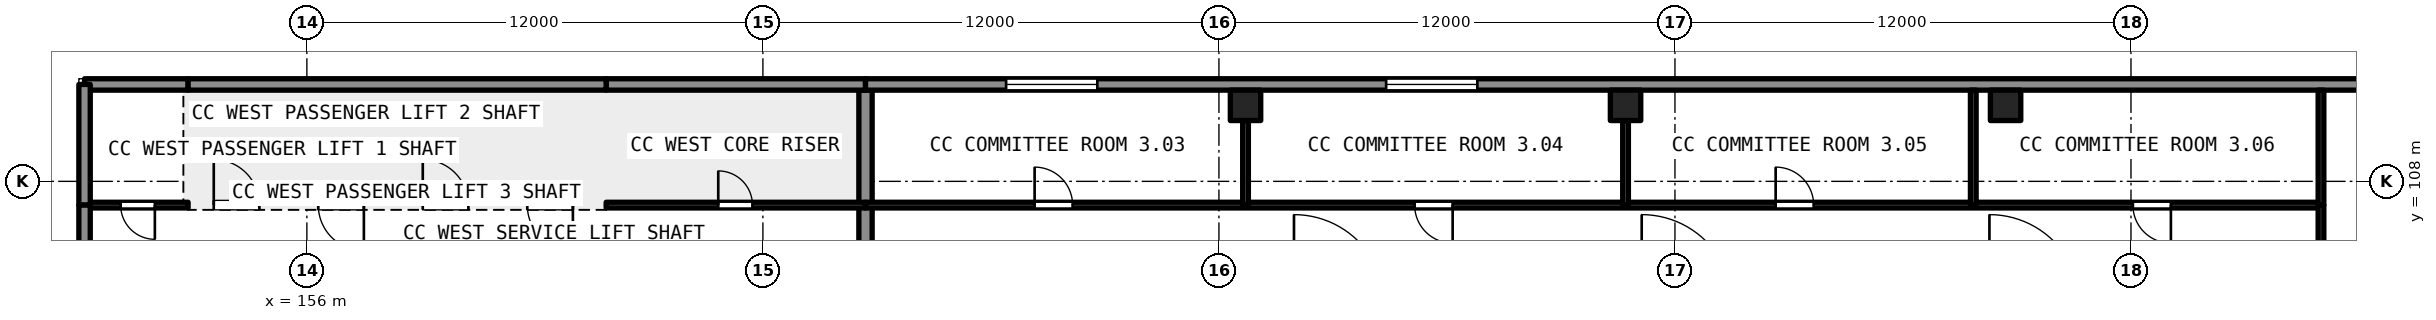
"""IFC4 building model, lengths in metres.
Left out: names, types, materials, properties, quantities, classifications, styles, units other than length and angle.
Written with IfcOpenShell. Run it as: python <this file> out.ifc"""

import sys

from ifc_helpers import new_model, si_unit, direction, frame, frame_2d, origin, origin_2d, place, context, subcontext, project, spatial, rectangle, extrude, element, fill, save


model = new_model("IFC4")
c1 = context("Model", 3, precision=1e-05, world=origin(), true_north=direction((0.0, 1.0)))
c2 = subcontext(c1, "Body", "Model", "MODEL_VIEW")
j1 = project(units=[si_unit("LENGTHUNIT", "METRE"), si_unit("PLANEANGLEUNIT", "RADIAN")], contexts=[c1])
p1 = place(None, origin())
s1 = spatial("IfcSite", under=j1, at=p1, CompositionType="ELEMENT")
p2 = place(p1, origin())
s2 = spatial("IfcBuilding", under=s1, at=p2, CompositionType="ELEMENT")
p3 = place(p2, frame((0.0, 0.0, 20.4)))
s3 = spatial("IfcBuildingStorey", under=s2, at=p3, CompositionType="ELEMENT", Elevation=20.4)
for number, where, z_axis, x_axis in (
    (1, (180.7, 110.0, 0.0), (0.0, 0.0, 1.0), (1.0, 0.0, 0.0)),
    (2, (190.7, 110.0, 0.0), (0.0, 0.0, 1.0), (1.0, 0.0, 0.0)),
    (3, (200.7, 110.0, 0.0), (0.0, 0.0, 1.0), (1.0, 0.0, 0.0)),
):
    element("IfcColumn", number, at=place(p3, frame(where, z_axis=z_axis, x_axis=x_axis)), inside=s3, PredefinedType="COLUMN", context=c2, shape_type="SweptSolid", body=[
        extrude(rectangle(XDim=0.8, YDim=0.8, at=origin_2d()), origin(), (0.0, 0.0, 1.0), 4.59),
    ])
p4 = place(p3, frame((170.7, 103.15, 0.0), z_axis=(0.0, 0.0, 1.0), x_axis=(0.0, 1.0, 0.0)))
e4 = element("IfcWall", 4, at=p4, inside=s3, PredefinedType="SHEAR", context=c2, shape_type="SweptSolid", body=[
    extrude(rectangle(XDim=7.25, YDim=0.35, at=frame_2d((3.625, 0.0))), origin(), (0.0, 0.0, 1.0), 4.59),
])
p5 = place(p4, frame((1.2, 0.0, 0.0)))
e5 = element("IfcOpeningElement", 5, at=p5, cuts=e4, PredefinedType="OPENING", context=c2, shape_type="SweptSolid", body=[
    extrude(rectangle(XDim=1.8, YDim=2.1, at=frame_2d((0.9, 1.05))), frame((0.0, 0.186, 0.0), z_axis=(0.0, -1.0, 0.0), x_axis=(1.0, 0.0, 0.0)), (0.0, 0.0, 1.0), 0.371),
])
p6 = place(p2, origin())
s4 = spatial("IfcBuildingStorey", under=s2, at=p6, CompositionType="ELEMENT", Elevation=0.0)
for number, where, z_axis, x_axis in (
    (6, (152.875, 107.375, -1.2), (0.0, 0.0, 1.0), (0.0, 1.0, 0.0)),
    (7, (155.625, 107.375, -1.2), (0.0, 0.0, 1.0), (0.0, 1.0, 0.0)),
    (8, (158.375, 107.375, -1.2), (0.0, 0.0, 1.0), (0.0, 1.0, 0.0)),
    (9, (161.125, 107.375, -1.2), (0.0, 0.0, 1.0), (0.0, 1.0, 0.0)),
    (10, (163.875, 107.375, -1.2), (0.0, 0.0, 1.0), (0.0, 1.0, 0.0)),
):
    element("IfcWall", number, at=place(p6, frame(where, z_axis=z_axis, x_axis=x_axis)), inside=s4, PredefinedType="SHEAR", context=c2, shape_type="SweptSolid", body=[
        extrude(rectangle(XDim=3.025, YDim=0.25, at=frame_2d((1.512, 0.0))), origin(), (0.0, 0.0, 1.0), 30.79),
    ])
p7 = place(p6, frame((163.875, 107.375, -1.2), z_axis=(0.0, 0.0, 1.0), x_axis=(-1.0, 0.0, 0.0)))
e11 = element("IfcWall", 11, at=p7, inside=s4, PredefinedType="SHEAR", context=c2, shape_type="SweptSolid", body=[
    extrude(rectangle(XDim=11.0, YDim=0.25, at=frame_2d((5.5, 0.0))), origin(), (0.0, 0.0, 1.0), 30.79),
])
p8 = place(p7, frame((9.125, 0.0, 1.2)))
e12 = element("IfcOpeningElement", 12, at=p8, cuts=e11, PredefinedType="OPENING", context=c2, shape_type="SweptSolid", body=[
    extrude(rectangle(XDim=1.2, YDim=2.1, at=frame_2d((0.6, 1.05))), frame((0.0, 0.135, 0.0), z_axis=(0.0, -1.0, 0.0), x_axis=(1.0, 0.0, 0.0)), (0.0, 0.0, 1.0), 0.271),
])
p9 = place(p7, frame((6.375, 0.0, 1.2)))
e13 = element("IfcOpeningElement", 13, at=p9, cuts=e11, PredefinedType="OPENING", context=c2, shape_type="SweptSolid", body=[
    extrude(rectangle(XDim=1.2, YDim=2.1, at=frame_2d((0.6, 1.05))), frame((0.0, 0.135, 0.0), z_axis=(0.0, -1.0, 0.0), x_axis=(1.0, 0.0, 0.0)), (0.0, 0.0, 1.0), 0.271),
])
p10 = place(p7, frame((3.625, 0.0, 1.2)))
e14 = element("IfcOpeningElement", 14, at=p10, cuts=e11, PredefinedType="OPENING", context=c2, shape_type="SweptSolid", body=[
    extrude(rectangle(XDim=1.2, YDim=2.1, at=frame_2d((0.6, 1.05))), frame((0.0, 0.135, 0.0), z_axis=(0.0, -1.0, 0.0), x_axis=(1.0, 0.0, 0.0)), (0.0, 0.0, 1.0), 0.271),
])
p11 = place(p7, frame((0.875, 0.0, 1.2)))
e15 = element("IfcOpeningElement", 15, at=p11, cuts=e11, PredefinedType="OPENING", context=c2, shape_type="SweptSolid", body=[
    extrude(rectangle(XDim=1.2, YDim=2.1, at=frame_2d((0.6, 1.05))), frame((0.0, 0.135, 0.0), z_axis=(0.0, -1.0, 0.0), x_axis=(1.0, 0.0, 0.0)), (0.0, 0.0, 1.0), 0.271),
])
p12 = place(p7, frame((9.125, 0.0, 10.2)))
e16 = element("IfcOpeningElement", 16, at=p12, cuts=e11, PredefinedType="OPENING", context=c2, shape_type="SweptSolid", body=[
    extrude(rectangle(XDim=1.2, YDim=2.1, at=frame_2d((0.6, 1.05))), frame((0.0, 0.135, 0.0), z_axis=(0.0, -1.0, 0.0), x_axis=(1.0, 0.0, 0.0)), (0.0, 0.0, 1.0), 0.271),
])
p13 = place(p7, frame((6.375, 0.0, 10.2)))
e17 = element("IfcOpeningElement", 17, at=p13, cuts=e11, PredefinedType="OPENING", context=c2, shape_type="SweptSolid", body=[
    extrude(rectangle(XDim=1.2, YDim=2.1, at=frame_2d((0.6, 1.05))), frame((0.0, 0.135, 0.0), z_axis=(0.0, -1.0, 0.0), x_axis=(1.0, 0.0, 0.0)), (0.0, 0.0, 1.0), 0.271),
])
p14 = place(p7, frame((3.625, 0.0, 10.2)))
e18 = element("IfcOpeningElement", 18, at=p14, cuts=e11, PredefinedType="OPENING", context=c2, shape_type="SweptSolid", body=[
    extrude(rectangle(XDim=1.2, YDim=2.1, at=frame_2d((0.6, 1.05))), frame((0.0, 0.135, 0.0), z_axis=(0.0, -1.0, 0.0), x_axis=(1.0, 0.0, 0.0)), (0.0, 0.0, 1.0), 0.271),
])
p15 = place(p7, frame((0.875, 0.0, 10.2)))
e19 = element("IfcOpeningElement", 19, at=p15, cuts=e11, PredefinedType="OPENING", context=c2, shape_type="SweptSolid", body=[
    extrude(rectangle(XDim=1.2, YDim=2.1, at=frame_2d((0.6, 1.05))), frame((0.0, 0.135, 0.0), z_axis=(0.0, -1.0, 0.0), x_axis=(1.0, 0.0, 0.0)), (0.0, 0.0, 1.0), 0.271),
])
p16 = place(p7, frame((9.125, 0.0, 16.2)))
e20 = element("IfcOpeningElement", 20, at=p16, cuts=e11, PredefinedType="OPENING", context=c2, shape_type="SweptSolid", body=[
    extrude(rectangle(XDim=1.2, YDim=2.1, at=frame_2d((0.6, 1.05))), frame((0.0, 0.135, 0.0), z_axis=(0.0, -1.0, 0.0), x_axis=(1.0, 0.0, 0.0)), (0.0, 0.0, 1.0), 0.271),
])
p17 = place(p7, frame((6.375, 0.0, 16.2)))
e21 = element("IfcOpeningElement", 21, at=p17, cuts=e11, PredefinedType="OPENING", context=c2, shape_type="SweptSolid", body=[
    extrude(rectangle(XDim=1.2, YDim=2.1, at=frame_2d((0.6, 1.05))), frame((0.0, 0.135, 0.0), z_axis=(0.0, -1.0, 0.0), x_axis=(1.0, 0.0, 0.0)), (0.0, 0.0, 1.0), 0.271),
])
p18 = place(p7, frame((3.625, 0.0, 16.2)))
e22 = element("IfcOpeningElement", 22, at=p18, cuts=e11, PredefinedType="OPENING", context=c2, shape_type="SweptSolid", body=[
    extrude(rectangle(XDim=1.2, YDim=2.1, at=frame_2d((0.6, 1.05))), frame((0.0, 0.135, 0.0), z_axis=(0.0, -1.0, 0.0), x_axis=(1.0, 0.0, 0.0)), (0.0, 0.0, 1.0), 0.271),
])
p19 = place(p7, frame((0.875, 0.0, 16.2)))
e23 = element("IfcOpeningElement", 23, at=p19, cuts=e11, PredefinedType="OPENING", context=c2, shape_type="SweptSolid", body=[
    extrude(rectangle(XDim=1.2, YDim=2.1, at=frame_2d((0.6, 1.05))), frame((0.0, 0.135, 0.0), z_axis=(0.0, -1.0, 0.0), x_axis=(1.0, 0.0, 0.0)), (0.0, 0.0, 1.0), 0.271),
])
p20 = place(p7, frame((9.125, 0.0, 21.6)))
e24 = element("IfcOpeningElement", 24, at=p20, cuts=e11, PredefinedType="OPENING", context=c2, shape_type="SweptSolid", body=[
    extrude(rectangle(XDim=1.2, YDim=2.1, at=frame_2d((0.6, 1.05))), frame((0.0, 0.135, 0.0), z_axis=(0.0, -1.0, 0.0), x_axis=(1.0, 0.0, 0.0)), (0.0, 0.0, 1.0), 0.271),
])
p21 = place(p7, frame((6.375, 0.0, 21.6)))
e25 = element("IfcOpeningElement", 25, at=p21, cuts=e11, PredefinedType="OPENING", context=c2, shape_type="SweptSolid", body=[
    extrude(rectangle(XDim=1.2, YDim=2.1, at=frame_2d((0.6, 1.05))), frame((0.0, 0.135, 0.0), z_axis=(0.0, -1.0, 0.0), x_axis=(1.0, 0.0, 0.0)), (0.0, 0.0, 1.0), 0.271),
])
p22 = place(p7, frame((3.625, 0.0, 21.6)))
e26 = element("IfcOpeningElement", 26, at=p22, cuts=e11, PredefinedType="OPENING", context=c2, shape_type="SweptSolid", body=[
    extrude(rectangle(XDim=1.2, YDim=2.1, at=frame_2d((0.6, 1.05))), frame((0.0, 0.135, 0.0), z_axis=(0.0, -1.0, 0.0), x_axis=(1.0, 0.0, 0.0)), (0.0, 0.0, 1.0), 0.271),
])
p23 = place(p7, frame((0.875, 0.0, 21.6)))
e27 = element("IfcOpeningElement", 27, at=p23, cuts=e11, PredefinedType="OPENING", context=c2, shape_type="SweptSolid", body=[
    extrude(rectangle(XDim=1.2, YDim=2.1, at=frame_2d((0.6, 1.05))), frame((0.0, 0.135, 0.0), z_axis=(0.0, -1.0, 0.0), x_axis=(1.0, 0.0, 0.0)), (0.0, 0.0, 1.0), 0.271),
])
p24 = place(p7, frame((9.125, 0.0, 26.6)))
e28 = element("IfcOpeningElement", 28, at=p24, cuts=e11, PredefinedType="OPENING", context=c2, shape_type="SweptSolid", body=[
    extrude(rectangle(XDim=1.2, YDim=2.1, at=frame_2d((0.6, 1.05))), frame((0.0, 0.135, 0.0), z_axis=(0.0, -1.0, 0.0), x_axis=(1.0, 0.0, 0.0)), (0.0, 0.0, 1.0), 0.271),
])
p25 = place(p7, frame((6.375, 0.0, 26.6)))
e29 = element("IfcOpeningElement", 29, at=p25, cuts=e11, PredefinedType="OPENING", context=c2, shape_type="SweptSolid", body=[
    extrude(rectangle(XDim=1.2, YDim=2.1, at=frame_2d((0.6, 1.05))), frame((0.0, 0.135, 0.0), z_axis=(0.0, -1.0, 0.0), x_axis=(1.0, 0.0, 0.0)), (0.0, 0.0, 1.0), 0.271),
])
p26 = place(p7, frame((3.625, 0.0, 26.6)))
e30 = element("IfcOpeningElement", 30, at=p26, cuts=e11, PredefinedType="OPENING", context=c2, shape_type="SweptSolid", body=[
    extrude(rectangle(XDim=1.2, YDim=2.1, at=frame_2d((0.6, 1.05))), frame((0.0, 0.135, 0.0), z_axis=(0.0, -1.0, 0.0), x_axis=(1.0, 0.0, 0.0)), (0.0, 0.0, 1.0), 0.271),
])
p27 = place(p7, frame((0.875, 0.0, 26.6)))
e31 = element("IfcOpeningElement", 31, at=p27, cuts=e11, PredefinedType="OPENING", context=c2, shape_type="SweptSolid", body=[
    extrude(rectangle(XDim=1.2, YDim=2.1, at=frame_2d((0.6, 1.05))), frame((0.0, 0.135, 0.0), z_axis=(0.0, -1.0, 0.0), x_axis=(1.0, 0.0, 0.0)), (0.0, 0.0, 1.0), 0.271),
])
p28 = place(p6, frame((152.875, 110.275, -1.2), z_axis=(0.0, 0.0, 1.0), x_axis=(1.0, 0.0, 0.0)))
e32 = element("IfcWall", 32, at=p28, inside=s4, PredefinedType="SHEAR", context=c2, shape_type="SweptSolid", body=[
    extrude(rectangle(XDim=11.0, YDim=0.25, at=frame_2d((5.5, 0.0))), origin(), (0.0, 0.0, 1.0), 30.79),
])
p29 = place(p3, frame((150.3, 107.375, 0.0), z_axis=(0.0, 0.0, 1.0), x_axis=(1.0, 0.0, 0.0)))
e33 = element("IfcWall", 33, at=p29, inside=s3, PredefinedType="PARTITIONING", context=c2, shape_type="SweptSolid", body=[
    extrude(rectangle(XDim=2.575, YDim=0.15, at=frame_2d((1.288, 0.0))), origin(), (0.0, 0.0, 1.0), 4.59),
])
p30 = place(p29, frame((0.8, 0.0, 0.0)))
e34 = element("IfcOpeningElement", 34, at=p30, cuts=e33, PredefinedType="OPENING", context=c2, shape_type="SweptSolid", body=[
    extrude(rectangle(XDim=0.9, YDim=2.1, at=frame_2d((0.45, 1.05))), frame((0.0, 0.085, 0.0), z_axis=(0.0, -1.0, 0.0), x_axis=(1.0, 0.0, 0.0)), (0.0, 0.0, 1.0), 0.171),
])
p31 = place(p3, frame((150.15, 110.55, 0.0), z_axis=(0.0, 0.0, 1.0), x_axis=(1.0, 0.0, 0.0)))
e35 = element("IfcWall", 35, at=p31, inside=s3, PredefinedType="SOLIDWALL", context=c2, shape_type="SweptSolid", body=[
    extrude(rectangle(XDim=2.725, YDim=0.3, at=frame_2d((1.363, 0.0))), origin(), (0.0, 0.0, 1.0), 4.59),
])
p32 = place(p3, frame((150.15, 107.375, 0.0), z_axis=(0.0, 0.0, 1.0), x_axis=(0.0, 1.0, 0.0)))
e36 = element("IfcWall", 36, at=p32, inside=s3, PredefinedType="SOLIDWALL", context=c2, shape_type="SweptSolid", body=[
    extrude(rectangle(XDim=3.175, YDim=0.3, at=frame_2d((1.587, 0.0))), origin(), (0.0, 0.0, 1.0), 4.59),
])
p33 = place(p3, frame((163.875, 107.375, 0.0), z_axis=(0.0, 0.0, 1.0), x_axis=(1.0, 0.0, 0.0)))
e37 = element("IfcWall", 37, at=p33, inside=s3, PredefinedType="PARTITIONING", context=c2, shape_type="SweptSolid", body=[
    extrude(rectangle(XDim=6.825, YDim=0.15, at=frame_2d((3.413, 0.0))), origin(), (0.0, 0.0, 1.0), 4.59),
])
p34 = place(p33, frame((2.95, 0.0, 0.0)))
e38 = element("IfcOpeningElement", 38, at=p34, cuts=e37, PredefinedType="OPENING", context=c2, shape_type="SweptSolid", body=[
    extrude(rectangle(XDim=0.9, YDim=2.1, at=frame_2d((0.45, 1.05))), frame((0.0, 0.085, 0.0), z_axis=(0.0, -1.0, 0.0), x_axis=(1.0, 0.0, 0.0)), (0.0, 0.0, 1.0), 0.171),
])
p35 = place(p3, frame((163.875, 110.55, 0.0), z_axis=(0.0, 0.0, 1.0), x_axis=(1.0, 0.0, 0.0)))
e39 = element("IfcWall", 39, at=p35, inside=s3, PredefinedType="SOLIDWALL", context=c2, shape_type="SweptSolid", body=[
    extrude(rectangle(XDim=6.825, YDim=0.3, at=frame_2d((3.413, 0.0))), origin(), (0.0, 0.0, 1.0), 4.59),
])
p36 = place(p3, frame((150.15, 103.15, 0.0), z_axis=(0.0, 0.0, 1.0), x_axis=(0.0, 1.0, 0.0)))
e40 = element("IfcWall", 40, at=p36, inside=s3, PredefinedType="SOLIDWALL", context=c2, shape_type="SweptSolid", body=[
    extrude(rectangle(XDim=4.225, YDim=0.3, at=frame_2d((2.113, 0.0))), origin(), (0.0, 0.0, 1.0), 4.59),
])
p37 = place(p3, frame((152.875, 110.55, 0.0), z_axis=(0.0, 0.0, 1.0), x_axis=(1.0, 0.0, 0.0)))
e41 = element("IfcWall", 41, at=p37, inside=s3, PredefinedType="SOLIDWALL", context=c2, shape_type="SweptSolid", body=[
    extrude(rectangle(XDim=11.0, YDim=0.3, at=frame_2d((5.5, 0.0))), origin(), (0.0, 0.0, 1.0), 4.59),
])
p38 = place(p3, frame((170.7, 110.55, 0.0), z_axis=(0.0, 0.0, 1.0), x_axis=(1.0, 0.0, 0.0)))
e42 = element("IfcWall", 42, at=p38, inside=s3, PredefinedType="SOLIDWALL", context=c2, shape_type="SweptSolid", body=[
    extrude(rectangle(XDim=50.0, YDim=0.3, at=frame_2d((25.0, 0.0))), origin(), (0.0, 0.0, 1.0), 4.59),
])
p39 = place(p38, frame((3.7, 0.0, 0.9)))
e43 = element("IfcOpeningElement", 43, at=p39, cuts=e42, PredefinedType="OPENING", context=c2, shape_type="SweptSolid", body=[
    extrude(rectangle(XDim=2.4, YDim=1.8, at=frame_2d((1.2, 0.9))), frame((0.0, 0.161, 0.0), z_axis=(0.0, -1.0, 0.0), x_axis=(1.0, 0.0, 0.0)), (0.0, 0.0, 1.0), 0.321),
])
p40 = place(p38, frame((13.7, 0.0, 0.9)))
e44 = element("IfcOpeningElement", 44, at=p40, cuts=e42, PredefinedType="OPENING", context=c2, shape_type="SweptSolid", body=[
    extrude(rectangle(XDim=2.4, YDim=1.8, at=frame_2d((1.2, 0.9))), frame((0.0, 0.161, 0.0), z_axis=(0.0, -1.0, 0.0), x_axis=(1.0, 0.0, 0.0)), (0.0, 0.0, 1.0), 0.321),
])
p41 = place(p3, frame((209.0, 107.375, 0.0), z_axis=(0.0, 0.0, 1.0), x_axis=(-1.0, 0.0, 0.0)))
e45 = element("IfcWall", 45, at=p41, inside=s3, PredefinedType="PARTITIONING", context=c2, shape_type="SweptSolid", body=[
    extrude(rectangle(XDim=38.3, YDim=0.15, at=frame_2d((19.15, 0.0))), origin(), (0.0, 0.0, 1.0), 4.59),
])
p42 = place(p41, frame((32.85, 0.0, 0.0)))
e46 = element("IfcOpeningElement", 46, at=p42, cuts=e45, PredefinedType="OPENING", context=c2, shape_type="SweptSolid", body=[
    extrude(rectangle(XDim=1.0, YDim=2.1, at=frame_2d((0.5, 1.05))), frame((0.0, 0.085, 0.0), z_axis=(0.0, -1.0, 0.0), x_axis=(1.0, 0.0, 0.0)), (0.0, 0.0, 1.0), 0.171),
])
p43 = place(p41, frame((22.85, 0.0, 0.0)))
e47 = element("IfcOpeningElement", 47, at=p43, cuts=e45, PredefinedType="OPENING", context=c2, shape_type="SweptSolid", body=[
    extrude(rectangle(XDim=1.0, YDim=2.1, at=frame_2d((0.5, 1.05))), frame((0.0, 0.085, 0.0), z_axis=(0.0, -1.0, 0.0), x_axis=(1.0, 0.0, 0.0)), (0.0, 0.0, 1.0), 0.171),
])
p44 = place(p41, frame((13.35, 0.0, 0.0)))
e48 = element("IfcOpeningElement", 48, at=p44, cuts=e45, PredefinedType="OPENING", context=c2, shape_type="SweptSolid", body=[
    extrude(rectangle(XDim=1.0, YDim=2.1, at=frame_2d((0.5, 1.05))), frame((0.0, 0.085, 0.0), z_axis=(0.0, -1.0, 0.0), x_axis=(1.0, 0.0, 0.0)), (0.0, 0.0, 1.0), 0.171),
])
p45 = place(p41, frame((3.95, 0.0, 0.0)))
e49 = element("IfcOpeningElement", 49, at=p45, cuts=e45, PredefinedType="OPENING", context=c2, shape_type="SweptSolid", body=[
    extrude(rectangle(XDim=1.0, YDim=2.1, at=frame_2d((0.5, 1.05))), frame((0.0, 0.085, 0.0), z_axis=(0.0, -1.0, 0.0), x_axis=(1.0, 0.0, 0.0)), (0.0, 0.0, 1.0), 0.171),
])
p46 = place(p3, frame((209.0, 104.725, 0.0), z_axis=(0.0, 0.0, 1.0), x_axis=(0.0, 1.0, 0.0)))
e50 = element("IfcWall", 50, at=p46, inside=s3, PredefinedType="PARTITIONING", context=c2, shape_type="SweptSolid", body=[
    extrude(rectangle(XDim=2.65, YDim=0.15, at=frame_2d((1.325, 0.0))), origin(), (0.0, 0.0, 1.0), 4.59),
])
p47 = place(p46, frame((0.375, 0.0, 0.0)))
e51 = element("IfcOpeningElement", 51, at=p47, cuts=e50, PredefinedType="OPENING", context=c2, shape_type="SweptSolid", body=[
    extrude(rectangle(XDim=1.0, YDim=2.1, at=frame_2d((0.5, 1.05))), frame((0.0, 0.085, 0.0), z_axis=(0.0, -1.0, 0.0), x_axis=(1.0, 0.0, 0.0)), (0.0, 0.0, 1.0), 0.171),
])
for number, where, z_axis, x_axis in (
    (52, (180.7, 107.375, 0.0), (0.0, 0.0, 1.0), (0.0, 1.0, 0.0)),
    (53, (190.7, 107.375, 0.0), (0.0, 0.0, 1.0), (0.0, 1.0, 0.0)),
):
    element("IfcWall", number, at=place(p3, frame(where, z_axis=z_axis, x_axis=x_axis)), inside=s3, PredefinedType="PARTITIONING", context=c2, shape_type="SweptSolid", body=[
        extrude(rectangle(XDim=2.225, YDim=0.15, at=frame_2d((1.113, 0.0))), origin(), (0.0, 0.0, 1.0), 4.59),
    ])
for number, where, z_axis, x_axis in (
    (54, (199.85, 107.375, 0.0), (0.0, 0.0, 1.0), (0.0, 1.0, 0.0)),
    (55, (209.0, 107.375, 0.0), (0.0, 0.0, 1.0), (0.0, 1.0, 0.0)),
):
    element("IfcWall", number, at=place(p3, frame(where, z_axis=z_axis, x_axis=x_axis)), inside=s3, PredefinedType="PARTITIONING", context=c2, shape_type="SweptSolid", body=[
        extrude(rectangle(XDim=3.025, YDim=0.15, at=frame_2d((1.512, 0.0))), origin(), (0.0, 0.0, 1.0), 4.59),
    ])
p48 = place(p42, origin())
e56 = element("IfcDoor", 56, at=p48, inside=s3, OperationType="SINGLE_SWING_RIGHT", PredefinedType="DOOR", context=c2, shape_type="SweptSolid", body=[
    extrude(rectangle(XDim=1.0, YDim=2.1, at=frame_2d((0.5, 1.05))), frame((0.0, 0.025, 0.0), z_axis=(0.0, -1.0, 0.0), x_axis=(1.0, 0.0, 0.0)), (0.0, 0.0, 1.0), 0.05),
])
fill(e46, e56)
p49 = place(p43, origin())
e57 = element("IfcDoor", 57, at=p49, inside=s3, OperationType="SINGLE_SWING_LEFT", PredefinedType="DOOR", context=c2, shape_type="SweptSolid", body=[
    extrude(rectangle(XDim=1.0, YDim=2.1, at=frame_2d((0.5, 1.05))), frame((0.0, 0.025, 0.0), z_axis=(0.0, -1.0, 0.0), x_axis=(1.0, 0.0, 0.0)), (0.0, 0.0, 1.0), 0.05),
])
fill(e47, e57)
p50 = place(p44, origin())
e58 = element("IfcDoor", 58, at=p50, inside=s3, OperationType="SINGLE_SWING_RIGHT", PredefinedType="DOOR", context=c2, shape_type="SweptSolid", body=[
    extrude(rectangle(XDim=1.0, YDim=2.1, at=frame_2d((0.5, 1.05))), frame((0.0, 0.025, 0.0), z_axis=(0.0, -1.0, 0.0), x_axis=(1.0, 0.0, 0.0)), (0.0, 0.0, 1.0), 0.05),
])
fill(e48, e58)
p51 = place(p45, origin())
e59 = element("IfcDoor", 59, at=p51, inside=s3, OperationType="SINGLE_SWING_LEFT", PredefinedType="DOOR", context=c2, shape_type="SweptSolid", body=[
    extrude(rectangle(XDim=1.0, YDim=2.1, at=frame_2d((0.5, 1.05))), frame((0.0, 0.025, 0.0), z_axis=(0.0, -1.0, 0.0), x_axis=(1.0, 0.0, 0.0)), (0.0, 0.0, 1.0), 0.05),
])
fill(e49, e59)
p52 = place(p20, origin())
e60 = element("IfcDoor", 60, at=p52, inside=s3, OperationType="SLIDING_TO_RIGHT", PredefinedType="DOOR", context=c2, shape_type="SweptSolid", body=[
    extrude(rectangle(XDim=1.2, YDim=2.1, at=frame_2d((0.6, 1.05))), frame((0.0, 0.025, 0.0), z_axis=(0.0, -1.0, 0.0), x_axis=(1.0, 0.0, 0.0)), (0.0, 0.0, 1.0), 0.05),
])
fill(e24, e60)
p53 = place(p21, origin())
e61 = element("IfcDoor", 61, at=p53, inside=s3, OperationType="SLIDING_TO_LEFT", PredefinedType="DOOR", context=c2, shape_type="SweptSolid", body=[
    extrude(rectangle(XDim=1.2, YDim=2.1, at=frame_2d((0.6, 1.05))), frame((0.0, 0.025, 0.0), z_axis=(0.0, -1.0, 0.0), x_axis=(1.0, 0.0, 0.0)), (0.0, 0.0, 1.0), 0.05),
])
fill(e25, e61)
p54 = place(p22, origin())
e62 = element("IfcDoor", 62, at=p54, inside=s3, OperationType="SLIDING_TO_RIGHT", PredefinedType="DOOR", context=c2, shape_type="SweptSolid", body=[
    extrude(rectangle(XDim=1.2, YDim=2.1, at=frame_2d((0.6, 1.05))), frame((0.0, 0.025, 0.0), z_axis=(0.0, -1.0, 0.0), x_axis=(1.0, 0.0, 0.0)), (0.0, 0.0, 1.0), 0.05),
])
fill(e26, e62)
p55 = place(p23, origin())
e63 = element("IfcDoor", 63, at=p55, inside=s3, OperationType="SLIDING_TO_LEFT", PredefinedType="DOOR", context=c2, shape_type="SweptSolid", body=[
    extrude(rectangle(XDim=1.2, YDim=2.1, at=frame_2d((0.6, 1.05))), frame((0.0, 0.025, 0.0), z_axis=(0.0, -1.0, 0.0), x_axis=(1.0, 0.0, 0.0)), (0.0, 0.0, 1.0), 0.05),
])
fill(e27, e63)
p56 = place(p30, origin())
e64 = element("IfcDoor", 64, at=p56, inside=s3, OperationType="SINGLE_SWING_RIGHT", PredefinedType="DOOR", context=c2, shape_type="SweptSolid", body=[
    extrude(rectangle(XDim=0.9, YDim=2.1, at=frame_2d((0.45, 1.05))), frame((0.0, 0.025, 0.0), z_axis=(0.0, -1.0, 0.0), x_axis=(1.0, 0.0, 0.0)), (0.0, 0.0, 1.0), 0.05),
])
fill(e34, e64)
p57 = place(p34, origin())
e65 = element("IfcDoor", 65, at=p57, inside=s3, OperationType="SINGLE_SWING_LEFT", PredefinedType="DOOR", context=c2, shape_type="SweptSolid", body=[
    extrude(rectangle(XDim=0.9, YDim=2.1, at=frame_2d((0.45, 1.05))), frame((0.0, 0.025, 0.0), z_axis=(0.0, -1.0, 0.0), x_axis=(1.0, 0.0, 0.0)), (0.0, 0.0, 1.0), 0.05),
])
fill(e38, e65)
p58 = place(p39, origin())
e66 = element("IfcWindow", 66, at=p58, inside=s3, PartitioningType="DOUBLE_PANEL_VERTICAL", PredefinedType="WINDOW", context=c2, shape_type="SweptSolid", body=[
    extrude(rectangle(XDim=2.4, YDim=1.8, at=frame_2d((1.2, 0.9))), frame((0.0, 0.03, 0.0), z_axis=(0.0, -1.0, 0.0), x_axis=(1.0, 0.0, 0.0)), (0.0, 0.0, 1.0), 0.06),
])
fill(e43, e66)
p59 = place(p40, origin())
e67 = element("IfcWindow", 67, at=p59, inside=s3, PartitioningType="DOUBLE_PANEL_VERTICAL", PredefinedType="WINDOW", context=c2, shape_type="SweptSolid", body=[
    extrude(rectangle(XDim=2.4, YDim=1.8, at=frame_2d((1.2, 0.9))), frame((0.0, 0.03, 0.0), z_axis=(0.0, -1.0, 0.0), x_axis=(1.0, 0.0, 0.0)), (0.0, 0.0, 1.0), 0.06),
])
fill(e44, e67)
save(model, sys.argv[1])
